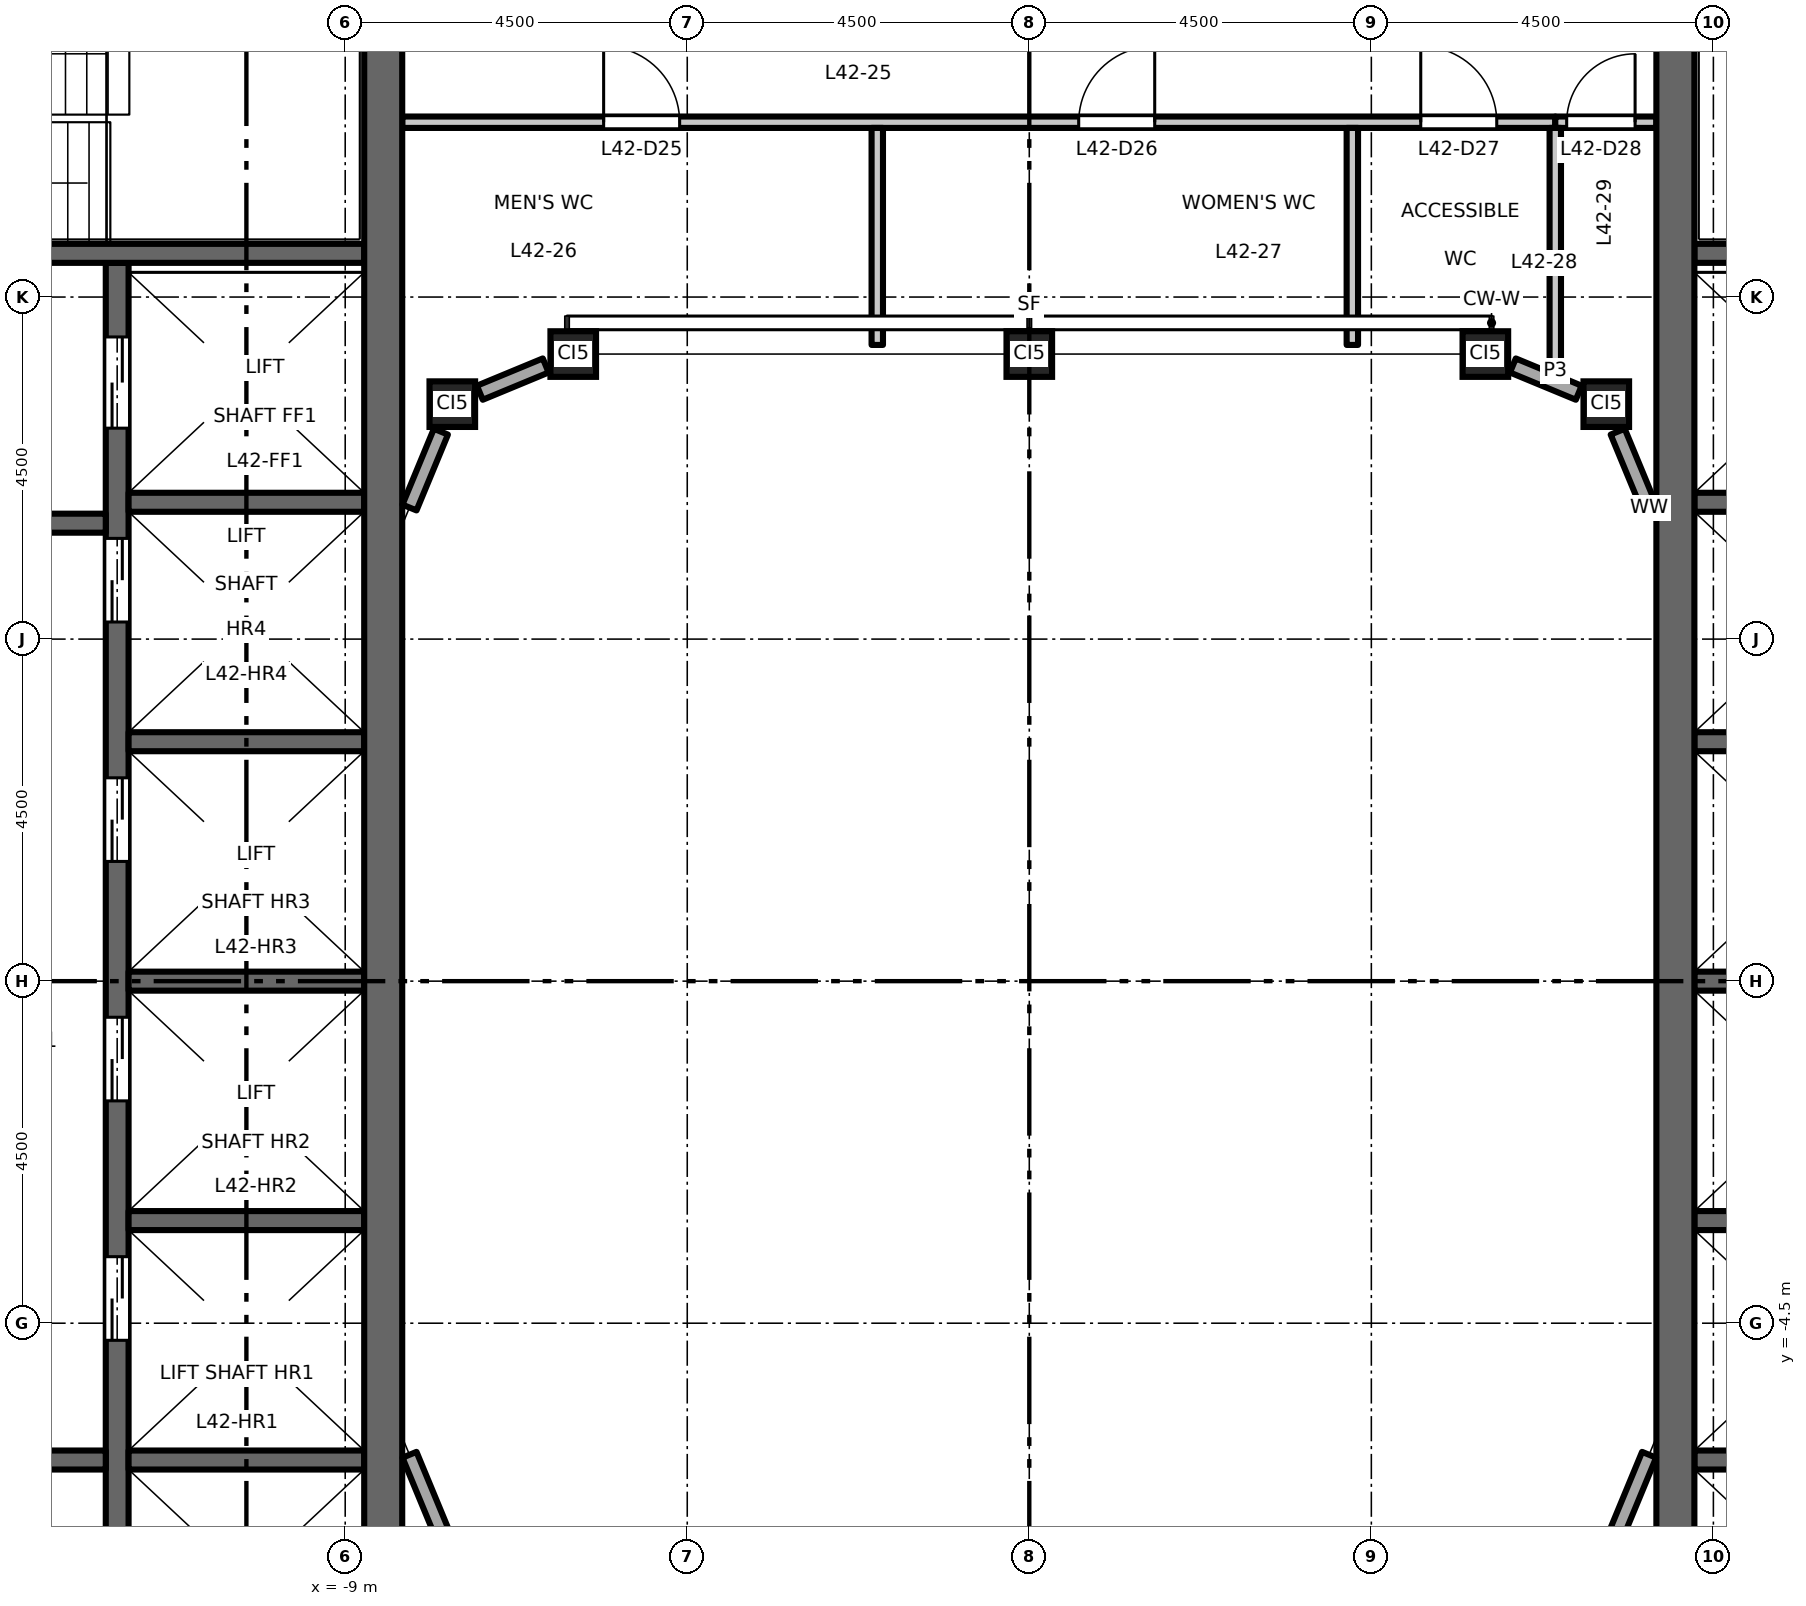
"""IFC4 building model, lengths in metres.
Left out: names, types, materials, properties, quantities, classifications, styles, units other than length and angle.
Written with IfcOpenShell. Run it as: python <this file> out.ifc"""

import sys

from ifc_helpers import new_model, si_unit, direction, frame, frame_2d, origin, origin_2d, place, context, subcontext, project, spatial, rectangle, hollow_rectangle, extrude, element, fill, save


model = new_model("IFC4")
c1 = context("Model", 3, precision=1e-05, world=origin(), true_north=direction((0.0, 1.0)))
c2 = subcontext(c1, "Body", "Model", "MODEL_VIEW")
j1 = project(units=[si_unit("LENGTHUNIT", "METRE"), si_unit("PLANEANGLEUNIT", "RADIAN")], contexts=[c1])
p1 = place(None, origin())
s1 = spatial("IfcSite", under=j1, at=p1, CompositionType="ELEMENT")
p2 = place(p1, origin())
s2 = spatial("IfcBuilding", under=s1, at=p2, CompositionType="ELEMENT")
p3 = place(p2, frame((0.0, 0.0, 197.2)))
s3 = spatial("IfcBuildingStorey", under=s2, at=p3, CompositionType="ELEMENT", Elevation=197.2)
for number, where, z_axis, x_axis in (
    (1, (-7.591, 7.591, 0.0), (0.0, 0.0, 1.0), (1.0, 0.0, 0.0)),
    (2, (-6.0, 8.25, 0.0), (0.0, 0.0, 1.0), (1.0, 0.0, 0.0)),
    (3, (0.0, 8.25, 0.0), (0.0, 0.0, 1.0), (1.0, 0.0, 0.0)),
    (4, (6.0, 8.25, 0.0), (0.0, 0.0, 1.0), (1.0, 0.0, 0.0)),
    (5, (7.591, 7.591, 0.0), (0.0, 0.0, 1.0), (1.0, 0.0, 0.0)),
):
    element("IfcColumn", number, at=place(p3, frame(where, z_axis=z_axis, x_axis=x_axis)), inside=s3, PredefinedType="COLUMN", context=c2, shape_type="SweptSolid", body=[
        extrude(hollow_rectangle(XDim=0.6, YDim=0.6, WallThickness=0.032, at=origin_2d()), origin(), (0.0, 0.0, 1.0), 4.5),
    ])
p4 = place(p3, frame((-12.0, -9.45, 0.0), z_axis=(0.0, 0.0, 1.0), x_axis=(0.0, 1.0, 0.0)))
e6 = element("IfcWall", 6, at=p4, inside=s3, PredefinedType="SHEAR", context=c2, shape_type="SweptSolid", body=[
    extrude(rectangle(XDim=18.9, YDim=0.3, at=frame_2d((9.45, 0.0))), origin(), (0.0, 0.0, 1.0), 4.35),
])
p5 = place(p4, frame((4.725, 0.0, 0.0)))
e7 = element("IfcOpeningElement", 7, at=p5, cuts=e6, PredefinedType="OPENING", context=c2, shape_type="SweptSolid", body=[
    extrude(rectangle(XDim=1.1, YDim=2.1, at=frame_2d((0.55, 1.05))), frame((0.0, 0.16, 0.0), z_axis=(0.0, -1.0, 0.0), x_axis=(1.0, 0.0, 0.0)), (0.0, 0.0, 1.0), 0.32),
])
p6 = place(p4, frame((7.875, 0.0, 0.0)))
e8 = element("IfcOpeningElement", 8, at=p6, cuts=e6, PredefinedType="OPENING", context=c2, shape_type="SweptSolid", body=[
    extrude(rectangle(XDim=1.1, YDim=2.1, at=frame_2d((0.55, 1.05))), frame((0.0, 0.16, 0.0), z_axis=(0.0, -1.0, 0.0), x_axis=(1.0, 0.0, 0.0)), (0.0, 0.0, 1.0), 0.32),
])
p7 = place(p4, frame((11.025, 0.0, 0.0)))
e9 = element("IfcOpeningElement", 9, at=p7, cuts=e6, PredefinedType="OPENING", context=c2, shape_type="SweptSolid", body=[
    extrude(rectangle(XDim=1.1, YDim=2.1, at=frame_2d((0.55, 1.05))), frame((0.0, 0.16, 0.0), z_axis=(0.0, -1.0, 0.0), x_axis=(1.0, 0.0, 0.0)), (0.0, 0.0, 1.0), 0.32),
])
p8 = place(p4, frame((14.175, 0.0, 0.0)))
e10 = element("IfcOpeningElement", 10, at=p8, cuts=e6, PredefinedType="OPENING", context=c2, shape_type="SweptSolid", body=[
    extrude(rectangle(XDim=1.1, YDim=2.1, at=frame_2d((0.55, 1.05))), frame((0.0, 0.16, 0.0), z_axis=(0.0, -1.0, 0.0), x_axis=(1.0, 0.0, 0.0)), (0.0, 0.0, 1.0), 0.32),
])
p9 = place(p4, frame((16.725, 0.0, 0.0)))
e11 = element("IfcOpeningElement", 11, at=p9, cuts=e6, PredefinedType="OPENING", context=c2, shape_type="SweptSolid", body=[
    extrude(rectangle(XDim=1.2, YDim=2.1, at=frame_2d((0.6, 1.05))), frame((0.0, 0.16, 0.0), z_axis=(0.0, -1.0, 0.0), x_axis=(1.0, 0.0, 0.0)), (0.0, 0.0, 1.0), 0.32),
])
p10 = place(p4, frame((0.975, 0.0, 0.0)))
e12 = element("IfcOpeningElement", 12, at=p10, cuts=e6, PredefinedType="OPENING", context=c2, shape_type="SweptSolid", body=[
    extrude(rectangle(XDim=1.2, YDim=2.1, at=frame_2d((0.6, 1.05))), frame((0.0, 0.16, 0.0), z_axis=(0.0, -1.0, 0.0), x_axis=(1.0, 0.0, 0.0)), (0.0, 0.0, 1.0), 0.32),
])
p11 = place(p3, frame((-12.15, 6.025, 0.0), z_axis=(0.0, 0.0, 1.0), x_axis=(-1.0, 0.0, 0.0)))
e13 = element("IfcWall", 13, at=p11, inside=s3, PredefinedType="SHEAR", context=c2, shape_type="SweptSolid", body=[
    extrude(rectangle(XDim=4.6, YDim=0.25, at=frame_2d((2.3, 0.0))), origin(), (0.0, 0.0, 1.0), 4.35),
])
p12 = place(p11, frame((1.8, 0.0, 0.0)))
e14 = element("IfcOpeningElement", 14, at=p12, cuts=e13, PredefinedType="OPENING", context=c2, shape_type="SweptSolid", body=[
    extrude(rectangle(XDim=1.0, YDim=2.1, at=frame_2d((0.5, 1.05))), frame((0.0, 0.135, 0.0), z_axis=(0.0, -1.0, 0.0), x_axis=(1.0, 0.0, 0.0)), (0.0, 0.0, 1.0), 0.27),
])
p13 = place(p3, frame((-12.15, -6.3, 0.0), z_axis=(0.0, 0.0, 1.0), x_axis=(-1.0, 0.0, 0.0)))
e15 = element("IfcWall", 15, at=p13, inside=s3, PredefinedType="SHEAR", context=c2, shape_type="SweptSolid", body=[
    extrude(rectangle(XDim=9.1, YDim=0.25, at=frame_2d((4.55, 0.0))), origin(), (0.0, 0.0, 1.0), 4.35),
])
p14 = place(p13, frame((1.8, 0.0, 0.0)))
e16 = element("IfcOpeningElement", 16, at=p14, cuts=e15, PredefinedType="OPENING", context=c2, shape_type="SweptSolid", body=[
    extrude(rectangle(XDim=1.0, YDim=2.1, at=frame_2d((0.5, 1.05))), frame((0.0, 0.135, 0.0), z_axis=(0.0, -1.0, 0.0), x_axis=(1.0, 0.0, 0.0)), (0.0, 0.0, 1.0), 0.27),
])
for number, where, z_axis, x_axis in (
    (17, (-8.75, 0.0, 0.0), (0.0, 0.0, 1.0), (-1.0, 0.0, 0.0)),
    (18, (-8.75, 3.15, 0.0), (0.0, 0.0, 1.0), (-1.0, 0.0, 0.0)),
    (19, (-8.75, 6.3, 0.0), (0.0, 0.0, 1.0), (-1.0, 0.0, 0.0)),
    (20, (-8.75, -3.15, 0.0), (0.0, 0.0, 1.0), (-1.0, 0.0, 0.0)),
    (21, (-8.75, -6.3, 0.0), (0.0, 0.0, 1.0), (-1.0, 0.0, 0.0)),
):
    element("IfcWall", number, at=place(p3, frame(where, z_axis=z_axis, x_axis=x_axis)), inside=s3, PredefinedType="SHEAR", context=c2, shape_type="SweptSolid", body=[
        extrude(rectangle(XDim=3.1, YDim=0.25, at=frame_2d((1.55, 0.0))), origin(), (0.0, 0.0, 1.0), 4.35),
    ])
p15 = place(p3, frame((-8.75, 9.575, 0.0), z_axis=(0.0, 0.0, 1.0), x_axis=(-1.0, 0.0, 0.0)))
e22 = element("IfcWall", 22, at=p15, inside=s3, PredefinedType="SHEAR", context=c2, shape_type="SweptSolid", body=[
    extrude(rectangle(XDim=8.0, YDim=0.25, at=frame_2d((4.0, 0.0))), origin(), (0.0, 0.0, 1.0), 4.35),
])
p16 = place(p15, frame((6.65, 0.0, 0.0)))
e23 = element("IfcOpeningElement", 23, at=p16, cuts=e22, PredefinedType="OPENING", context=c2, shape_type="SweptSolid", body=[
    extrude(rectangle(XDim=1.1, YDim=2.1, at=frame_2d((0.55, 1.05))), frame((0.0, 0.135, 0.0), z_axis=(0.0, -1.0, 0.0), x_axis=(1.0, 0.0, 0.0)), (0.0, 0.0, 1.0), 0.27),
])
p17 = place(p3, frame((-8.5, -13.0, 0.0), z_axis=(0.0, 0.0, 1.0), x_axis=(0.0, 1.0, 0.0)))
e24 = element("IfcWall", 24, at=p17, inside=s3, PredefinedType="SHEAR", context=c2, shape_type="SweptSolid", body=[
    extrude(rectangle(XDim=26.0, YDim=0.5, at=frame_2d((13.0, 0.0))), origin(), (0.0, 0.0, 1.0), 4.35),
])
for number, where, z_axis, x_axis in (
    (25, (8.75, 0.0, 0.0), (0.0, 0.0, 1.0), (1.0, 0.0, 0.0)),
    (26, (8.75, 3.15, 0.0), (0.0, 0.0, 1.0), (1.0, 0.0, 0.0)),
    (27, (8.75, 6.3, 0.0), (0.0, 0.0, 1.0), (1.0, 0.0, 0.0)),
    (28, (8.75, -3.15, 0.0), (0.0, 0.0, 1.0), (1.0, 0.0, 0.0)),
    (29, (8.75, -6.3, 0.0), (0.0, 0.0, 1.0), (1.0, 0.0, 0.0)),
):
    element("IfcWall", number, at=place(p3, frame(where, z_axis=z_axis, x_axis=x_axis)), inside=s3, PredefinedType="SHEAR", context=c2, shape_type="SweptSolid", body=[
        extrude(rectangle(XDim=3.1, YDim=0.25, at=frame_2d((1.55, 0.0))), origin(), (0.0, 0.0, 1.0), 4.35),
    ])
p18 = place(p3, frame((8.75, 9.575, 0.0), z_axis=(0.0, 0.0, 1.0), x_axis=(1.0, 0.0, 0.0)))
e30 = element("IfcWall", 30, at=p18, inside=s3, PredefinedType="SHEAR", context=c2, shape_type="SweptSolid", body=[
    extrude(rectangle(XDim=8.0, YDim=0.25, at=frame_2d((4.0, 0.0))), origin(), (0.0, 0.0, 1.0), 4.35),
])
p19 = place(p18, frame((6.65, 0.0, 0.0)))
e31 = element("IfcOpeningElement", 31, at=p19, cuts=e30, PredefinedType="OPENING", context=c2, shape_type="SweptSolid", body=[
    extrude(rectangle(XDim=1.1, YDim=2.1, at=frame_2d((0.55, 1.05))), frame((0.0, 0.135, 0.0), z_axis=(0.0, -1.0, 0.0), x_axis=(1.0, 0.0, 0.0)), (0.0, 0.0, 1.0), 0.27),
])
p20 = place(p3, frame((8.5, -13.0, 0.0), z_axis=(0.0, 0.0, 1.0), x_axis=(0.0, 1.0, 0.0)))
e32 = element("IfcWall", 32, at=p20, inside=s3, PredefinedType="SHEAR", context=c2, shape_type="SweptSolid", body=[
    extrude(rectangle(XDim=26.0, YDim=0.5, at=frame_2d((13.0, 0.0))), origin(), (0.0, 0.0, 1.0), 4.35),
])
for number, where, z_axis, x_axis in (
    (33, (7.741, -7.229, 0.0), (0.0, 0.0, 1.0), (0.383, 0.924, 0.0)),
    (34, (8.154, 6.231, 0.0), (0.0, 0.0, 1.0), (-0.383, 0.924, 0.0)),
):
    element("IfcWall", number, at=place(p3, frame(where, z_axis=z_axis, x_axis=x_axis)), inside=s3, PredefinedType="STANDARD", context=c2, shape_type="SweptSolid", body=[
        extrude(rectangle(XDim=1.08, YDim=0.2, at=frame_2d((0.54, 0.0))), origin(), (0.0, 0.0, 1.0), 3.918),
    ])
for number, where, z_axis, x_axis in (
    (35, (7.229, 7.741, 0.0), (0.0, 0.0, 1.0), (-0.924, 0.383, 0.0)),
    (36, (-6.362, 8.1, 0.0), (0.0, 0.0, 1.0), (-0.924, -0.383, 0.0)),
):
    element("IfcWall", number, at=place(p3, frame(where, z_axis=z_axis, x_axis=x_axis)), inside=s3, PredefinedType="STANDARD", context=c2, shape_type="SweptSolid", body=[
        extrude(rectangle(XDim=0.938, YDim=0.2, at=frame_2d((0.469, 0.0))), origin(), (0.0, 0.0, 1.0), 3.918),
    ])
for number, where, z_axis, x_axis in (
    (37, (-7.741, 7.229, 0.0), (0.0, 0.0, 1.0), (-0.383, -0.924, 0.0)),
    (38, (-8.154, -6.231, 0.0), (0.0, 0.0, 1.0), (0.383, -0.924, 0.0)),
):
    element("IfcWall", number, at=place(p3, frame(where, z_axis=z_axis, x_axis=x_axis)), inside=s3, PredefinedType="STANDARD", context=c2, shape_type="SweptSolid", body=[
        extrude(rectangle(XDim=1.08, YDim=0.2, at=frame_2d((0.54, 0.0))), origin(), (0.0, 0.0, 1.0), 3.918),
    ])
p21 = place(p3, frame((-8.25, 11.3, 0.0), z_axis=(0.0, 0.0, 1.0), x_axis=(1.0, 0.0, 0.0)))
e39 = element("IfcWall", 39, at=p21, inside=s3, PredefinedType="PARTITIONING", context=c2, shape_type="SweptSolid", body=[
    extrude(rectangle(XDim=15.17, YDim=0.15, at=frame_2d((7.585, 0.0))), origin(), (0.0, 0.0, 1.0), 4.35),
])
p22 = place(p21, frame((2.65, 0.0, 0.0)))
e40 = element("IfcOpeningElement", 40, at=p22, cuts=e39, PredefinedType="OPENING", context=c2, shape_type="SweptSolid", body=[
    extrude(rectangle(XDim=1.0, YDim=2.1, at=frame_2d((0.5, 1.05))), frame((0.0, 0.085, 0.0), z_axis=(0.0, -1.0, 0.0), x_axis=(1.0, 0.0, 0.0)), (0.0, 0.0, 1.0), 0.17),
])
p23 = place(p21, frame((8.9, 0.0, 0.0)))
e41 = element("IfcOpeningElement", 41, at=p23, cuts=e39, PredefinedType="OPENING", context=c2, shape_type="SweptSolid", body=[
    extrude(rectangle(XDim=1.0, YDim=2.1, at=frame_2d((0.5, 1.05))), frame((0.0, 0.085, 0.0), z_axis=(0.0, -1.0, 0.0), x_axis=(1.0, 0.0, 0.0)), (0.0, 0.0, 1.0), 0.17),
])
p24 = place(p21, frame((13.4, 0.0, 0.0)))
e42 = element("IfcOpeningElement", 42, at=p24, cuts=e39, PredefinedType="OPENING", context=c2, shape_type="SweptSolid", body=[
    extrude(rectangle(XDim=1.0, YDim=2.1, at=frame_2d((0.5, 1.05))), frame((0.0, 0.085, 0.0), z_axis=(0.0, -1.0, 0.0), x_axis=(1.0, 0.0, 0.0)), (0.0, 0.0, 1.0), 0.17),
])
p25 = place(p3, frame((6.92, 11.3, 0.0), z_axis=(0.0, 0.0, 1.0), x_axis=(1.0, 0.0, 0.0)))
e43 = element("IfcWall", 43, at=p25, inside=s3, PredefinedType="PARTITIONING", context=c2, shape_type="SweptSolid", body=[
    extrude(rectangle(XDim=1.33, YDim=0.15, at=frame_2d((0.665, 0.0))), origin(), (0.0, 0.0, 1.0), 4.35),
])
p26 = place(p25, frame((0.15, 0.0, 0.0)))
e44 = element("IfcOpeningElement", 44, at=p26, cuts=e43, PredefinedType="OPENING", context=c2, shape_type="SweptSolid", body=[
    extrude(rectangle(XDim=0.9, YDim=2.1, at=frame_2d((0.45, 1.05))), frame((0.0, 0.085, 0.0), z_axis=(0.0, -1.0, 0.0), x_axis=(1.0, 0.0, 0.0)), (0.0, 0.0, 1.0), 0.17),
])
for number, where, z_axis, x_axis in (
    (45, (-2.0, 8.37, 0.0), (0.0, 0.0, 1.0), (0.0, 1.0, 0.0)),
    (46, (4.25, 8.37, 0.0), (0.0, 0.0, 1.0), (0.0, 1.0, 0.0)),
):
    element("IfcWall", number, at=place(p3, frame(where, z_axis=z_axis, x_axis=x_axis)), inside=s3, PredefinedType="PARTITIONING", context=c2, shape_type="SweptSolid", body=[
        extrude(rectangle(XDim=2.855, YDim=0.15, at=frame_2d((1.427, 0.0))), origin(), (0.0, 0.0, 1.0), 4.35),
    ])
p27 = place(p3, frame((6.92, 8.029, 0.0), z_axis=(0.0, 0.0, 1.0), x_axis=(0.0, 1.0, 0.0)))
e47 = element("IfcWall", 47, at=p27, inside=s3, PredefinedType="PARTITIONING", context=c2, shape_type="SweptSolid", body=[
    extrude(rectangle(XDim=3.196, YDim=0.15, at=frame_2d((1.598, 0.0))), origin(), (0.0, 0.0, 1.0), 4.35),
])
p28 = place(p5, origin())
e48 = element("IfcDoor", 48, at=p28, inside=s3, OperationType="DOUBLE_DOOR_SLIDING", PredefinedType="DOOR", context=c2, shape_type="SweptSolid", body=[
    extrude(rectangle(XDim=1.1, YDim=2.1, at=frame_2d((0.55, 1.05))), frame((0.0, 0.025, 0.0), z_axis=(0.0, -1.0, 0.0), x_axis=(1.0, 0.0, 0.0)), (0.0, 0.0, 1.0), 0.05),
])
fill(e7, e48)
p29 = place(p6, origin())
e49 = element("IfcDoor", 49, at=p29, inside=s3, OperationType="DOUBLE_DOOR_SLIDING", PredefinedType="DOOR", context=c2, shape_type="SweptSolid", body=[
    extrude(rectangle(XDim=1.1, YDim=2.1, at=frame_2d((0.55, 1.05))), frame((0.0, 0.025, 0.0), z_axis=(0.0, -1.0, 0.0), x_axis=(1.0, 0.0, 0.0)), (0.0, 0.0, 1.0), 0.05),
])
fill(e8, e49)
p30 = place(p7, origin())
e50 = element("IfcDoor", 50, at=p30, inside=s3, OperationType="DOUBLE_DOOR_SLIDING", PredefinedType="DOOR", context=c2, shape_type="SweptSolid", body=[
    extrude(rectangle(XDim=1.1, YDim=2.1, at=frame_2d((0.55, 1.05))), frame((0.0, 0.025, 0.0), z_axis=(0.0, -1.0, 0.0), x_axis=(1.0, 0.0, 0.0)), (0.0, 0.0, 1.0), 0.05),
])
fill(e9, e50)
p31 = place(p8, origin())
e51 = element("IfcDoor", 51, at=p31, inside=s3, OperationType="DOUBLE_DOOR_SLIDING", PredefinedType="DOOR", context=c2, shape_type="SweptSolid", body=[
    extrude(rectangle(XDim=1.1, YDim=2.1, at=frame_2d((0.55, 1.05))), frame((0.0, 0.025, 0.0), z_axis=(0.0, -1.0, 0.0), x_axis=(1.0, 0.0, 0.0)), (0.0, 0.0, 1.0), 0.05),
])
fill(e10, e51)
p32 = place(p9, origin())
e52 = element("IfcDoor", 52, at=p32, inside=s3, OperationType="DOUBLE_DOOR_SLIDING", PredefinedType="DOOR", context=c2, shape_type="SweptSolid", body=[
    extrude(rectangle(XDim=1.2, YDim=2.1, at=frame_2d((0.6, 1.05))), frame((0.0, 0.025, 0.0), z_axis=(0.0, -1.0, 0.0), x_axis=(1.0, 0.0, 0.0)), (0.0, 0.0, 1.0), 0.05),
])
fill(e11, e52)
p33 = place(p22, origin())
e53 = element("IfcDoor", 53, at=p33, inside=s3, OperationType="SINGLE_SWING_LEFT", PredefinedType="DOOR", context=c2, shape_type="SweptSolid", body=[
    extrude(rectangle(XDim=1.0, YDim=2.1, at=frame_2d((0.5, 1.05))), frame((0.0, 0.025, 0.0), z_axis=(0.0, -1.0, 0.0), x_axis=(1.0, 0.0, 0.0)), (0.0, 0.0, 1.0), 0.05),
])
fill(e40, e53)
p34 = place(p23, origin())
e54 = element("IfcDoor", 54, at=p34, inside=s3, OperationType="SINGLE_SWING_RIGHT", PredefinedType="DOOR", context=c2, shape_type="SweptSolid", body=[
    extrude(rectangle(XDim=1.0, YDim=2.1, at=frame_2d((0.5, 1.05))), frame((0.0, 0.025, 0.0), z_axis=(0.0, -1.0, 0.0), x_axis=(1.0, 0.0, 0.0)), (0.0, 0.0, 1.0), 0.05),
])
fill(e41, e54)
p35 = place(p24, origin())
e55 = element("IfcDoor", 55, at=p35, inside=s3, OperationType="SINGLE_SWING_LEFT", PredefinedType="DOOR", context=c2, shape_type="SweptSolid", body=[
    extrude(rectangle(XDim=1.0, YDim=2.1, at=frame_2d((0.5, 1.05))), frame((0.0, 0.025, 0.0), z_axis=(0.0, -1.0, 0.0), x_axis=(1.0, 0.0, 0.0)), (0.0, 0.0, 1.0), 0.05),
])
fill(e42, e55)
p36 = place(p26, origin())
e56 = element("IfcDoor", 56, at=p36, inside=s3, OperationType="SINGLE_SWING_RIGHT", PredefinedType="DOOR", context=c2, shape_type="SweptSolid", body=[
    extrude(rectangle(XDim=0.9, YDim=2.1, at=frame_2d((0.45, 1.05))), frame((0.0, 0.025, 0.0), z_axis=(0.0, -1.0, 0.0), x_axis=(1.0, 0.0, 0.0)), (0.0, 0.0, 1.0), 0.05),
])
fill(e44, e56)
save(model, sys.argv[1])
